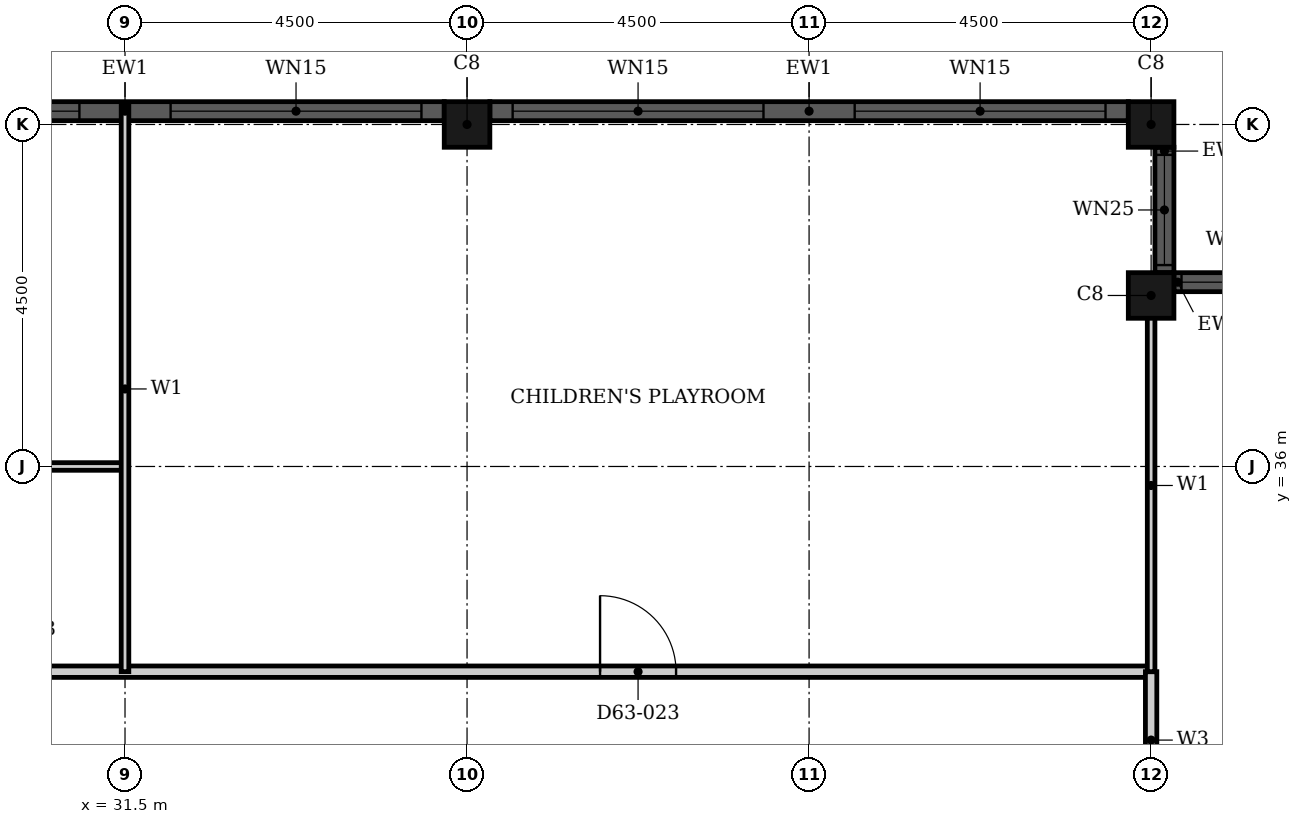
"""IFC4 building model, lengths in metres.
Left out: names, types, materials, properties, quantities, classifications, styles, units other than length and angle.
Written with IfcOpenShell. Run it as: python <this file> out.ifc"""

import sys

from ifc_helpers import new_model, si_unit, direction, frame, frame_2d, origin, origin_2d, place, context, subcontext, project, spatial, rectangle, hollow_rectangle, extrude, element, fill, save


model = new_model("IFC4")
c1 = context("Model", 3, precision=1e-05, world=origin(), true_north=direction((0.0, 1.0)))
c2 = subcontext(c1, "Body", "Model", "MODEL_VIEW")
j1 = project(units=[si_unit("LENGTHUNIT", "METRE"), si_unit("PLANEANGLEUNIT", "RADIAN")], contexts=[c1])
p1 = place(None, origin())
s1 = spatial("IfcSite", under=j1, at=p1, CompositionType="ELEMENT")
p2 = place(p1, origin())
s2 = spatial("IfcBuilding", under=s1, at=p2, CompositionType="ELEMENT")
p3 = place(p2, frame((0.0, 0.0, 249.0)))
s3 = spatial("IfcBuildingStorey", under=s2, at=p3, CompositionType="ELEMENT", Elevation=249.0)
for number, where, z_axis, x_axis in (
    (1, (45.0, 38.25, 0.0), (0.0, 0.0, 1.0), (1.0, 0.0, 0.0)),
    (2, (45.0, 40.5, 0.0), (0.0, 0.0, 1.0), (1.0, 0.0, 0.0)),
    (3, (36.0, 40.5, 0.0), (0.0, 0.0, 1.0), (1.0, 0.0, 0.0)),
):
    element("IfcColumn", number, at=place(p3, frame(where, z_axis=z_axis, x_axis=x_axis)), inside=s3, PredefinedType="COLUMN", context=c2, shape_type="SweptSolid", body=[
        extrude(hollow_rectangle(XDim=0.6, YDim=0.6, WallThickness=0.02, at=origin_2d()), origin(), (0.0, 0.0, 1.0), 3.7),
    ])
p4 = place(p3, frame((46.95, 38.425, 0.0), z_axis=(0.0, 0.0, 1.0), x_axis=(-1.0, 0.0, 0.0)))
e4 = element("IfcWall", 4, at=p4, inside=s3, PredefinedType="SOLIDWALL", context=c2, shape_type="SweptSolid", body=[
    extrude(rectangle(XDim=1.65, YDim=0.25, at=frame_2d((0.825, 0.0))), origin(), (0.0, 0.0, 1.0), 3.7),
])
p5 = place(p4, frame((0.1, 0.0, 0.9)))
e5 = element("IfcOpeningElement", 5, at=p5, cuts=e4, PredefinedType="OPENING", context=c2, shape_type="SweptSolid", body=[
    extrude(rectangle(XDim=1.45, YDim=1.85, at=frame_2d((0.725, 0.925))), frame((0.0, 0.135, 0.0), z_axis=(0.0, -1.0, 0.0), x_axis=(1.0, 0.0, 0.0)), (0.0, 0.0, 1.0), 0.27),
])
p6 = place(p3, frame((45.175, 38.55, 0.0), z_axis=(0.0, 0.0, 1.0), x_axis=(0.0, 1.0, 0.0)))
e6 = element("IfcWall", 6, at=p6, inside=s3, PredefinedType="SOLIDWALL", context=c2, shape_type="SweptSolid", body=[
    extrude(rectangle(XDim=1.65, YDim=0.25, at=frame_2d((0.825, 0.0))), origin(), (0.0, 0.0, 1.0), 3.7),
])
p7 = place(p6, frame((0.1, 0.0, 0.9)))
e7 = element("IfcOpeningElement", 7, at=p7, cuts=e6, PredefinedType="OPENING", context=c2, shape_type="SweptSolid", body=[
    extrude(rectangle(XDim=1.45, YDim=1.85, at=frame_2d((0.725, 0.925))), frame((0.0, 0.135, 0.0), z_axis=(0.0, -1.0, 0.0), x_axis=(1.0, 0.0, 0.0)), (0.0, 0.0, 1.0), 0.27),
])
p8 = place(p3, frame((44.7, 40.675, 0.0), z_axis=(0.0, 0.0, 1.0), x_axis=(-1.0, 0.0, 0.0)))
e8 = element("IfcWall", 8, at=p8, inside=s3, PredefinedType="SOLIDWALL", context=c2, shape_type="SweptSolid", body=[
    extrude(rectangle(XDim=8.4, YDim=0.25, at=frame_2d((4.2, 0.0))), origin(), (0.0, 0.0, 1.0), 3.7),
])
p9 = place(p8, frame((0.3, 0.0, 0.45)))
e9 = element("IfcOpeningElement", 9, at=p9, cuts=e8, PredefinedType="OPENING", context=c2, shape_type="SweptSolid", body=[
    extrude(rectangle(XDim=3.3, YDim=2.3, at=frame_2d((1.65, 1.15))), frame((0.0, 0.135, 0.0), z_axis=(0.0, -1.0, 0.0), x_axis=(1.0, 0.0, 0.0)), (0.0, 0.0, 1.0), 0.27),
])
p10 = place(p8, frame((4.8, 0.0, 0.45)))
e10 = element("IfcOpeningElement", 10, at=p10, cuts=e8, PredefinedType="OPENING", context=c2, shape_type="SweptSolid", body=[
    extrude(rectangle(XDim=3.3, YDim=2.3, at=frame_2d((1.65, 1.15))), frame((0.0, 0.135, 0.0), z_axis=(0.0, -1.0, 0.0), x_axis=(1.0, 0.0, 0.0)), (0.0, 0.0, 1.0), 0.27),
])
p11 = place(p3, frame((35.7, 40.675, 0.0), z_axis=(0.0, 0.0, 1.0), x_axis=(-1.0, 0.0, 0.0)))
e11 = element("IfcWall", 11, at=p11, inside=s3, PredefinedType="SOLIDWALL", context=c2, shape_type="SweptSolid", body=[
    extrude(rectangle(XDim=8.4, YDim=0.25, at=frame_2d((4.2, 0.0))), origin(), (0.0, 0.0, 1.0), 3.7),
])
p12 = place(p11, frame((0.3, 0.0, 0.45)))
e12 = element("IfcOpeningElement", 12, at=p12, cuts=e11, PredefinedType="OPENING", context=c2, shape_type="SweptSolid", body=[
    extrude(rectangle(XDim=3.3, YDim=2.3, at=frame_2d((1.65, 1.15))), frame((0.0, 0.135, 0.0), z_axis=(0.0, -1.0, 0.0), x_axis=(1.0, 0.0, 0.0)), (0.0, 0.0, 1.0), 0.27),
])
p13 = place(p11, frame((4.8, 0.0, 0.45)))
e13 = element("IfcOpeningElement", 13, at=p13, cuts=e11, PredefinedType="OPENING", context=c2, shape_type="SweptSolid", body=[
    extrude(rectangle(XDim=3.3, YDim=2.3, at=frame_2d((1.65, 1.15))), frame((0.0, 0.135, 0.0), z_axis=(0.0, -1.0, 0.0), x_axis=(1.0, 0.0, 0.0)), (0.0, 0.0, 1.0), 0.27),
])
p14 = place(p3, frame((20.4, 33.3, 0.0), z_axis=(0.0, 0.0, 1.0), x_axis=(1.0, 0.0, 0.0)))
e14 = element("IfcWall", 14, at=p14, inside=s3, PredefinedType="PARTITIONING", context=c2, shape_type="SweptSolid", body=[
    extrude(rectangle(XDim=24.6, YDim=0.15, at=frame_2d((12.3, 0.0))), origin(), (0.0, 0.0, 1.0), 3.4),
])
p15 = place(p14, frame((1.6, 0.0, 0.0)))
e15 = element("IfcOpeningElement", 15, at=p15, cuts=e14, PredefinedType="OPENING", context=c2, shape_type="SweptSolid", body=[
    extrude(rectangle(XDim=1.0, YDim=2.2, at=frame_2d((0.5, 1.1))), frame((0.0, 0.085, 0.0), z_axis=(0.0, -1.0, 0.0), x_axis=(1.0, 0.0, 0.0)), (0.0, 0.0, 1.0), 0.17),
])
p16 = place(p14, frame((17.35, 0.0, 0.0)))
e16 = element("IfcOpeningElement", 16, at=p16, cuts=e14, PredefinedType="OPENING", context=c2, shape_type="SweptSolid", body=[
    extrude(rectangle(XDim=1.0, YDim=2.1, at=frame_2d((0.5, 1.05))), frame((0.0, 0.085, 0.0), z_axis=(0.0, -1.0, 0.0), x_axis=(1.0, 0.0, 0.0)), (0.0, 0.0, 1.0), 0.17),
])
p17 = place(p3, frame((45.0, 31.5, 0.0), z_axis=(0.0, 0.0, 1.0), x_axis=(0.0, 1.0, 0.0)))
e17 = element("IfcWall", 17, at=p17, inside=s3, PredefinedType="PARTITIONING", context=c2, shape_type="SweptSolid", body=[
    extrude(rectangle(XDim=1.8, YDim=0.15, at=frame_2d((0.9, 0.0))), origin(), (0.0, 0.0, 1.0), 3.4),
])
p18 = place(p3, frame((24.6, 36.0, 0.0), z_axis=(0.0, 0.0, 1.0), x_axis=(1.0, 0.0, 0.0)))
e18 = element("IfcWall", 18, at=p18, inside=s3, PredefinedType="PARTITIONING", context=c2, shape_type="SweptSolid", body=[
    extrude(rectangle(XDim=6.9, YDim=0.1, at=frame_2d((3.45, 0.0))), origin(), (0.0, 0.0, 1.0), 3.4),
])
p19 = place(p18, frame((4.65, 0.0, 0.0)))
e19 = element("IfcOpeningElement", 19, at=p19, cuts=e18, PredefinedType="OPENING", context=c2, shape_type="SweptSolid", body=[
    extrude(rectangle(XDim=0.9, YDim=2.1, at=frame_2d((0.45, 1.05))), frame((0.0, 0.06, 0.0), z_axis=(0.0, -1.0, 0.0), x_axis=(1.0, 0.0, 0.0)), (0.0, 0.0, 1.0), 0.12),
])
p20 = place(p3, frame((31.5, 33.3, 0.0), z_axis=(0.0, 0.0, 1.0), x_axis=(0.0, 1.0, 0.0)))
e20 = element("IfcWall", 20, at=p20, inside=s3, PredefinedType="PARTITIONING", context=c2, shape_type="SweptSolid", body=[
    extrude(rectangle(XDim=7.44, YDim=0.1, at=frame_2d((3.72, 0.0))), origin(), (0.0, 0.0, 1.0), 3.4),
])
p21 = place(p3, frame((45.0, 33.3, 0.0), z_axis=(0.0, 0.0, 1.0), x_axis=(0.0, 1.0, 0.0)))
e21 = element("IfcWall", 21, at=p21, inside=s3, PredefinedType="PARTITIONING", context=c2, shape_type="SweptSolid", body=[
    extrude(rectangle(XDim=4.9, YDim=0.1, at=frame_2d((2.45, 0.0))), origin(), (0.0, 0.0, 1.0), 3.4),
])
p22 = place(p5, origin())
e22 = element("IfcWindow", 22, at=p22, inside=s3, PartitioningType="SINGLE_PANEL", PredefinedType="WINDOW", context=c2, shape_type="SweptSolid", body=[
    extrude(rectangle(XDim=1.45, YDim=1.85, at=frame_2d((0.725, 0.925))), frame((0.0, 0.03, 0.0), z_axis=(0.0, -1.0, 0.0), x_axis=(1.0, 0.0, 0.0)), (0.0, 0.0, 1.0), 0.06),
])
fill(e5, e22)
p23 = place(p7, origin())
e23 = element("IfcWindow", 23, at=p23, inside=s3, PartitioningType="SINGLE_PANEL", PredefinedType="WINDOW", context=c2, shape_type="SweptSolid", body=[
    extrude(rectangle(XDim=1.45, YDim=1.85, at=frame_2d((0.725, 0.925))), frame((0.0, 0.03, 0.0), z_axis=(0.0, -1.0, 0.0), x_axis=(1.0, 0.0, 0.0)), (0.0, 0.0, 1.0), 0.06),
])
fill(e7, e23)
p24 = place(p9, origin())
e24 = element("IfcWindow", 24, at=p24, inside=s3, PartitioningType="SINGLE_PANEL", PredefinedType="WINDOW", context=c2, shape_type="SweptSolid", body=[
    extrude(rectangle(XDim=3.3, YDim=2.3, at=frame_2d((1.65, 1.15))), frame((0.0, 0.03, 0.0), z_axis=(0.0, -1.0, 0.0), x_axis=(1.0, 0.0, 0.0)), (0.0, 0.0, 1.0), 0.06),
])
fill(e9, e24)
p25 = place(p10, origin())
e25 = element("IfcWindow", 25, at=p25, inside=s3, PartitioningType="SINGLE_PANEL", PredefinedType="WINDOW", context=c2, shape_type="SweptSolid", body=[
    extrude(rectangle(XDim=3.3, YDim=2.3, at=frame_2d((1.65, 1.15))), frame((0.0, 0.03, 0.0), z_axis=(0.0, -1.0, 0.0), x_axis=(1.0, 0.0, 0.0)), (0.0, 0.0, 1.0), 0.06),
])
fill(e10, e25)
p26 = place(p12, origin())
e26 = element("IfcWindow", 26, at=p26, inside=s3, PartitioningType="SINGLE_PANEL", PredefinedType="WINDOW", context=c2, shape_type="SweptSolid", body=[
    extrude(rectangle(XDim=3.3, YDim=2.3, at=frame_2d((1.65, 1.15))), frame((0.0, 0.03, 0.0), z_axis=(0.0, -1.0, 0.0), x_axis=(1.0, 0.0, 0.0)), (0.0, 0.0, 1.0), 0.06),
])
fill(e12, e26)
p27 = place(p13, origin())
e27 = element("IfcWindow", 27, at=p27, inside=s3, PartitioningType="SINGLE_PANEL", PredefinedType="WINDOW", context=c2, shape_type="SweptSolid", body=[
    extrude(rectangle(XDim=3.3, YDim=2.3, at=frame_2d((1.65, 1.15))), frame((0.0, 0.03, 0.0), z_axis=(0.0, -1.0, 0.0), x_axis=(1.0, 0.0, 0.0)), (0.0, 0.0, 1.0), 0.06),
])
fill(e13, e27)
p28 = place(p16, origin())
e28 = element("IfcDoor", 28, at=p28, inside=s3, OperationType="SINGLE_SWING_LEFT", PredefinedType="DOOR", context=c2, shape_type="SweptSolid", body=[
    extrude(rectangle(XDim=1.0, YDim=2.1, at=frame_2d((0.5, 1.05))), frame((0.0, 0.025, 0.0), z_axis=(0.0, -1.0, 0.0), x_axis=(1.0, 0.0, 0.0)), (0.0, 0.0, 1.0), 0.05),
])
fill(e16, e28)
save(model, sys.argv[1])
